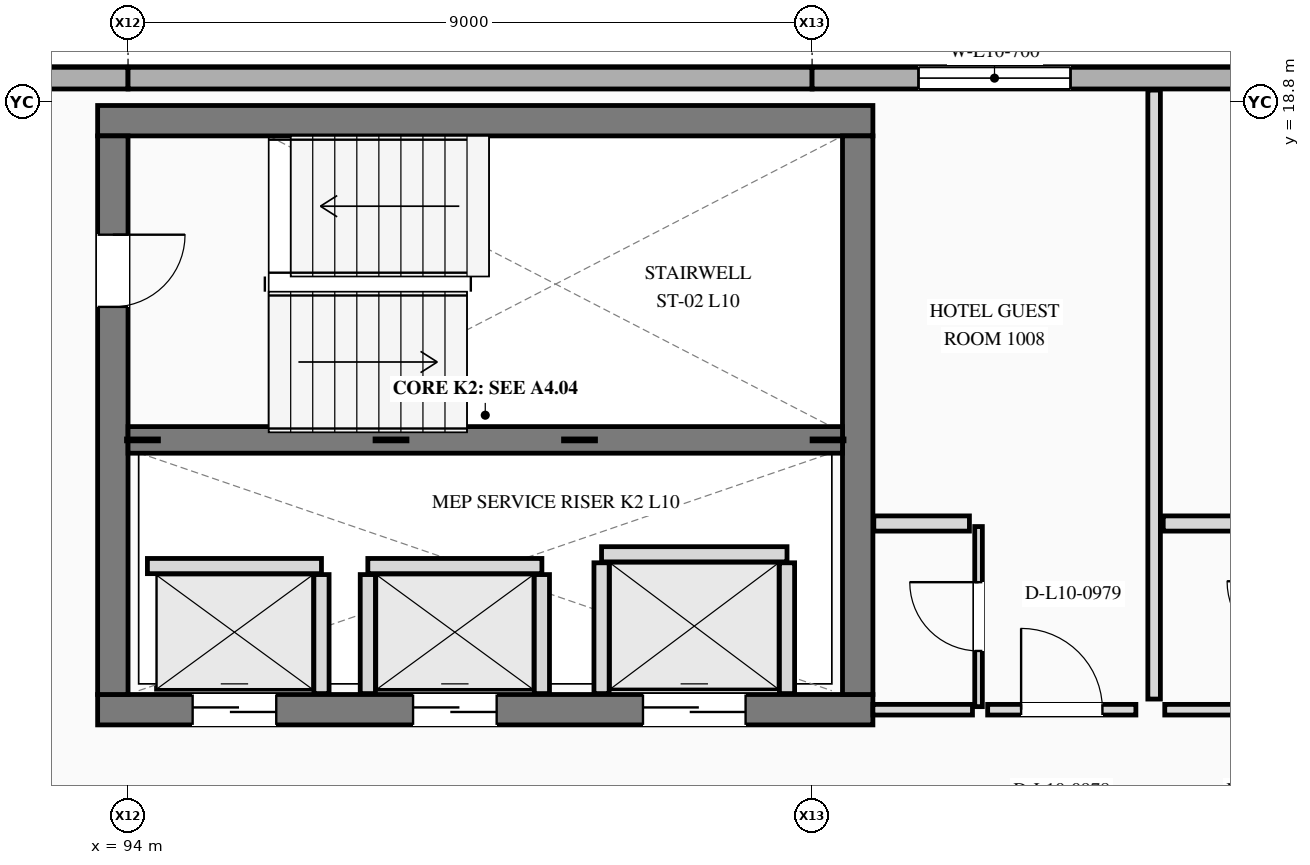
"""IFC4 building model, lengths in metres.
Left out: names, types, materials, properties, quantities, classifications, styles, units other than length and angle.
Written with IfcOpenShell. Run it as: python <this file> out.ifc"""

import sys

from ifc_helpers import new_model, si_unit, direction, frame, frame_2d, origin, place, context, subcontext, project, spatial, rectangle, extrude, element, fill, save


model = new_model("IFC4")
c1 = context("Model", 3, precision=1e-05, world=origin(), true_north=direction((0.0, 1.0)))
c2 = subcontext(c1, "Body", "Model", "MODEL_VIEW")
j1 = project(units=[si_unit("LENGTHUNIT", "METRE"), si_unit("PLANEANGLEUNIT", "RADIAN")], contexts=[c1])
p1 = place(None, origin())
s1 = spatial("IfcSite", under=j1, at=p1, CompositionType="ELEMENT")
p2 = place(p1, origin())
s2 = spatial("IfcBuilding", under=s1, at=p2, CompositionType="ELEMENT")
p3 = place(p2, frame((0.0, 0.0, 41.1)))
s3 = spatial("IfcBuildingStorey", under=s2, at=p3, CompositionType="ELEMENT", Elevation=41.1)
p4 = place(p3, frame((94.0, 19.11, 0.0), z_axis=(0.0, 0.0, 1.0), x_axis=(-1.0, 0.0, 0.0)))
e1 = element("IfcWall", 1, at=p4, inside=s3, PredefinedType="STANDARD", context=c2, shape_type="SweptSolid", body=[
    extrude(rectangle(XDim=9.31, YDim=0.285, at=frame_2d((4.655, 0.0))), origin(), (0.0, 0.0, 1.0), 3.5),
])
p5 = place(p3, frame((103.0, 19.11, 0.0), z_axis=(0.0, 0.0, 1.0), x_axis=(-1.0, 0.0, 0.0)))
e2 = element("IfcWall", 2, at=p5, inside=s3, PredefinedType="STANDARD", context=c2, shape_type="SweptSolid", body=[
    extrude(rectangle(XDim=9.0, YDim=0.285, at=frame_2d((4.5, 0.0))), origin(), (0.0, 0.0, 1.0), 3.5),
])
p6 = place(p3, frame((112.0, 19.11, 0.0), z_axis=(0.0, 0.0, 1.0), x_axis=(-1.0, 0.0, 0.0)))
e3 = element("IfcWall", 3, at=p6, inside=s3, PredefinedType="STANDARD", context=c2, shape_type="SweptSolid", body=[
    extrude(rectangle(XDim=9.0, YDim=0.285, at=frame_2d((4.5, 0.0))), origin(), (0.0, 0.0, 1.0), 3.5),
])
p7 = place(p6, frame((5.6, 0.0, 0.85)))
e4 = element("IfcOpeningElement", 4, at=p7, cuts=e3, PredefinedType="OPENING", context=c2, shape_type="SweptSolid", body=[
    extrude(rectangle(XDim=2.0, YDim=1.65, at=frame_2d((1.0, 0.825))), frame((0.0, 0.152, 0.0), z_axis=(0.0, -1.0, 0.0), x_axis=(1.0, 0.0, 0.0)), (0.0, 0.0, 1.0), 0.305),
])
p8 = place(p6, frame((1.4, 0.0, 0.85)))
e5 = element("IfcOpeningElement", 5, at=p8, cuts=e3, PredefinedType="OPENING", context=c2, shape_type="SweptSolid", body=[
    extrude(rectangle(XDim=2.0, YDim=1.65, at=frame_2d((1.0, 0.825))), frame((0.0, 0.152, 0.0), z_axis=(0.0, -1.0, 0.0), x_axis=(1.0, 0.0, 0.0)), (0.0, 0.0, 1.0), 0.305),
])
p9 = place(p3, frame((93.6, 10.8, 0.0), z_axis=(0.0, 0.0, 1.0), x_axis=(1.0, 0.0, 0.0)))
e6 = element("IfcWall", 6, at=p9, inside=s3, PredefinedType="SHEAR", context=c2, shape_type="SweptSolid", body=[
    extrude(rectangle(XDim=10.2, YDim=0.4, at=frame_2d((5.1, 0.0))), origin(), (0.0, 0.0, 1.0), 3.5),
])
p10 = place(p9, frame((1.25, 0.0, 0.0)))
e7 = element("IfcOpeningElement", 7, at=p10, cuts=e6, PredefinedType="OPENING", context=c2, shape_type="SweptSolid", body=[
    extrude(rectangle(XDim=1.1, YDim=2.2, at=frame_2d((0.55, 1.1))), frame((0.0, 0.21, 0.0), z_axis=(0.0, -1.0, 0.0), x_axis=(1.0, 0.0, 0.0)), (0.0, 0.0, 1.0), 0.42),
])
p11 = place(p9, frame((4.15, 0.0, 0.0)))
e8 = element("IfcOpeningElement", 8, at=p11, cuts=e6, PredefinedType="OPENING", context=c2, shape_type="SweptSolid", body=[
    extrude(rectangle(XDim=1.1, YDim=2.2, at=frame_2d((0.55, 1.1))), frame((0.0, 0.21, 0.0), z_axis=(0.0, -1.0, 0.0), x_axis=(1.0, 0.0, 0.0)), (0.0, 0.0, 1.0), 0.42),
])
p12 = place(p9, frame((7.175, 0.0, 0.0)))
e9 = element("IfcOpeningElement", 9, at=p12, cuts=e6, PredefinedType="OPENING", context=c2, shape_type="SweptSolid", body=[
    extrude(rectangle(XDim=1.35, YDim=2.3, at=frame_2d((0.675, 1.15))), frame((0.0, 0.21, 0.0), z_axis=(0.0, -1.0, 0.0), x_axis=(1.0, 0.0, 0.0)), (0.0, 0.0, 1.0), 0.42),
])
p13 = place(p3, frame((103.8, 18.55, 0.0), z_axis=(0.0, 0.0, 1.0), x_axis=(-1.0, 0.0, 0.0)))
e10 = element("IfcWall", 10, at=p13, inside=s3, PredefinedType="SHEAR", context=c2, shape_type="SweptSolid", body=[
    extrude(rectangle(XDim=10.2, YDim=0.4, at=frame_2d((5.1, 0.0))), origin(), (0.0, 0.0, 1.0), 3.5),
])
p14 = place(p3, frame((93.8, 18.35, 0.0), z_axis=(0.0, 0.0, 1.0), x_axis=(0.0, -1.0, 0.0)))
e11 = element("IfcWall", 11, at=p14, inside=s3, PredefinedType="SHEAR", context=c2, shape_type="SweptSolid", body=[
    extrude(rectangle(XDim=7.35, YDim=0.4, at=frame_2d((3.675, 0.0))), origin(), (0.0, 0.0, 1.0), 3.5),
])
p15 = place(p14, frame((1.3, 0.0, 0.0)))
e12 = element("IfcOpeningElement", 12, at=p15, cuts=e11, PredefinedType="OPENING", context=c2, shape_type="SweptSolid", body=[
    extrude(rectangle(XDim=0.95, YDim=2.2, at=frame_2d((0.475, 1.1))), frame((0.0, 0.21, 0.0), z_axis=(0.0, -1.0, 0.0), x_axis=(1.0, 0.0, 0.0)), (0.0, 0.0, 1.0), 0.42),
])
p16 = place(p3, frame((103.6, 11.0, 0.0), z_axis=(0.0, 0.0, 1.0), x_axis=(0.0, 1.0, 0.0)))
e13 = element("IfcWall", 13, at=p16, inside=s3, PredefinedType="SHEAR", context=c2, shape_type="SweptSolid", body=[
    extrude(rectangle(XDim=7.35, YDim=0.4, at=frame_2d((3.675, 0.0))), origin(), (0.0, 0.0, 1.0), 3.5),
])
p17 = place(p3, frame((94.0, 14.35, 0.0), z_axis=(0.0, 0.0, 1.0), x_axis=(1.0, 0.0, 0.0)))
e14 = element("IfcWall", 14, at=p17, inside=s3, PredefinedType="SHEAR", context=c2, shape_type="SweptSolid", body=[
    extrude(rectangle(XDim=9.4, YDim=0.35, at=frame_2d((4.7, 0.0))), origin(), (0.0, 0.0, 1.0), 3.5),
])
p18 = place(p3, frame((94.255, 12.69, 0.0), z_axis=(0.0, 0.0, 1.0), x_axis=(1.0, 0.0, 0.0)))
e15 = element("IfcWall", 15, at=p18, inside=s3, PredefinedType="PLUMBINGWALL", context=c2, shape_type="SweptSolid", body=[
    extrude(rectangle(XDim=2.29, YDim=0.2, at=frame_2d((1.145, 0.0))), origin(), (0.0, 0.0, 1.0), 3.18),
])
p19 = place(p3, frame((96.545, 11.012, 0.0), z_axis=(0.0, 0.0, 1.0), x_axis=(0.0, 1.0, 0.0)))
e16 = element("IfcWall", 16, at=p19, inside=s3, PredefinedType="PLUMBINGWALL", context=c2, shape_type="SweptSolid", body=[
    extrude(rectangle(XDim=1.566, YDim=0.2, at=frame_2d((0.783, 0.0))), origin(), (0.0, 0.0, 1.0), 3.18),
])
p20 = place(p3, frame((97.155, 12.69, 0.0), z_axis=(0.0, 0.0, 1.0), x_axis=(1.0, 0.0, 0.0)))
e17 = element("IfcWall", 17, at=p20, inside=s3, PredefinedType="PLUMBINGWALL", context=c2, shape_type="SweptSolid", body=[
    extrude(rectangle(XDim=2.29, YDim=0.2, at=frame_2d((1.145, 0.0))), origin(), (0.0, 0.0, 1.0), 3.18),
])
for number, where, z_axis, x_axis in (
    (18, (97.155, 11.012, 0.0), (0.0, 0.0, 1.0), (0.0, 1.0, 0.0)),
    (19, (99.445, 11.012, 0.0), (0.0, 0.0, 1.0), (0.0, 1.0, 0.0)),
):
    element("IfcWall", number, at=place(p3, frame(where, z_axis=z_axis, x_axis=x_axis)), inside=s3, PredefinedType="PLUMBINGWALL", context=c2, shape_type="SweptSolid", body=[
        extrude(rectangle(XDim=1.566, YDim=0.2, at=frame_2d((0.783, 0.0))), origin(), (0.0, 0.0, 1.0), 3.18),
    ])
p21 = place(p3, frame((100.23, 12.845, 0.0), z_axis=(0.0, 0.0, 1.0), x_axis=(1.0, 0.0, 0.0)))
e20 = element("IfcWall", 20, at=p21, inside=s3, PredefinedType="PLUMBINGWALL", context=c2, shape_type="SweptSolid", body=[
    extrude(rectangle(XDim=2.44, YDim=0.2, at=frame_2d((1.22, 0.0))), origin(), (0.0, 0.0, 1.0), 3.18),
])
for number, where, z_axis, x_axis in (
    (21, (100.23, 11.012, 0.0), (0.0, 0.0, 1.0), (0.0, 1.0, 0.0)),
    (22, (102.67, 11.012, 0.0), (0.0, 0.0, 1.0), (0.0, 1.0, 0.0)),
):
    element("IfcWall", number, at=place(p3, frame(where, z_axis=z_axis, x_axis=x_axis)), inside=s3, PredefinedType="PLUMBINGWALL", context=c2, shape_type="SweptSolid", body=[
        extrude(rectangle(XDim=1.721, YDim=0.2, at=frame_2d((0.86, 0.0))), origin(), (0.0, 0.0, 1.0), 3.18),
    ])
p22 = place(p3, frame((103.8, 10.8, 0.0), z_axis=(0.0, 0.0, 1.0), x_axis=(1.0, 0.0, 0.0)))
e23 = element("IfcWall", 23, at=p22, inside=s3, PredefinedType="PARTITIONING", context=c2, shape_type="SweptSolid", body=[
    extrude(rectangle(XDim=1.31, YDim=0.14, at=frame_2d((0.655, 0.0))), origin(), (0.0, 0.0, 1.0), 3.18),
])
p23 = place(p3, frame((105.31, 10.8, 0.0), z_axis=(0.0, 0.0, 1.0), x_axis=(1.0, 0.0, 0.0)))
e24 = element("IfcWall", 24, at=p23, inside=s3, PredefinedType="PARTITIONING", context=c2, shape_type="SweptSolid", body=[
    extrude(rectangle(XDim=1.95, YDim=0.14, at=frame_2d((0.975, 0.0))), origin(), (0.0, 0.0, 1.0), 3.18),
])
p24 = place(p23, frame((0.44, 0.0, 0.0)))
e25 = element("IfcOpeningElement", 25, at=p24, cuts=e24, PredefinedType="OPENING", context=c2, shape_type="SweptSolid", body=[
    extrude(rectangle(XDim=1.07, YDim=2.25, at=frame_2d((0.535, 1.125))), frame((0.0, 0.08, 0.0), z_axis=(0.0, -1.0, 0.0), x_axis=(1.0, 0.0, 0.0)), (0.0, 0.0, 1.0), 0.16),
])
p25 = place(p3, frame((107.5, 10.94, 0.0), z_axis=(0.0, 0.0, 1.0), x_axis=(0.0, 1.0, 0.0)))
e26 = element("IfcWall", 26, at=p25, inside=s3, PredefinedType="PARTITIONING", context=c2, shape_type="SweptSolid", body=[
    extrude(rectangle(XDim=8.012, YDim=0.165, at=frame_2d((4.006, 0.0))), origin(), (0.0, 0.0, 1.0), 3.18),
])
p26 = place(p3, frame((105.19, 10.84, 0.0), z_axis=(0.0, 0.0, 1.0), x_axis=(0.0, 1.0, 0.0)))
e27 = element("IfcWall", 27, at=p26, inside=s3, PredefinedType="PARTITIONING", context=c2, shape_type="SweptSolid", body=[
    extrude(rectangle(XDim=2.37, YDim=0.1, at=frame_2d((1.185, 0.0))), origin(), (0.0, 0.0, 1.0), 3.18),
])
p27 = place(p26, frame((0.733, 0.0, 0.0)))
e28 = element("IfcOpeningElement", 28, at=p27, cuts=e27, PredefinedType="OPENING", context=c2, shape_type="SweptSolid", body=[
    extrude(rectangle(XDim=0.905, YDim=2.1, at=frame_2d((0.453, 1.05))), frame((0.0, 0.06, 0.0), z_axis=(0.0, -1.0, 0.0), x_axis=(1.0, 0.0, 0.0)), (0.0, 0.0, 1.0), 0.12),
])
p28 = place(p3, frame((103.812, 13.25, 0.0), z_axis=(0.0, 0.0, 1.0), x_axis=(1.0, 0.0, 0.0)))
e29 = element("IfcWall", 29, at=p28, inside=s3, PredefinedType="PLUMBINGWALL", context=c2, shape_type="SweptSolid", body=[
    extrude(rectangle(XDim=1.258, YDim=0.2, at=frame_2d((0.629, 0.0))), origin(), (0.0, 0.0, 1.0), 3.18),
])
p29 = place(p3, frame((107.64, 10.8, 0.0), z_axis=(0.0, 0.0, 1.0), x_axis=(1.0, 0.0, 0.0)))
e30 = element("IfcWall", 30, at=p29, inside=s3, PredefinedType="PARTITIONING", context=c2, shape_type="SweptSolid", body=[
    extrude(rectangle(XDim=1.67, YDim=0.14, at=frame_2d((0.835, 0.0))), origin(), (0.0, 0.0, 1.0), 3.18),
])
p30 = place(p3, frame((107.62, 13.25, 0.0), z_axis=(0.0, 0.0, 1.0), x_axis=(1.0, 0.0, 0.0)))
e31 = element("IfcWall", 31, at=p30, inside=s3, PredefinedType="PLUMBINGWALL", context=c2, shape_type="SweptSolid", body=[
    extrude(rectangle(XDim=1.65, YDim=0.2, at=frame_2d((0.825, 0.0))), origin(), (0.0, 0.0, 1.0), 3.18),
])
p31 = place(p7, origin())
e32 = element("IfcWindow", 32, at=p31, inside=s3, PartitioningType="SINGLE_PANEL", PredefinedType="WINDOW", context=c2, shape_type="SweptSolid", body=[
    extrude(rectangle(XDim=2.0, YDim=1.65, at=frame_2d((1.0, 0.825))), frame((0.0, 0.03, 0.0), z_axis=(0.0, -1.0, 0.0), x_axis=(1.0, 0.0, 0.0)), (0.0, 0.0, 1.0), 0.06),
])
fill(e4, e32)
p32 = place(p15, origin())
e33 = element("IfcDoor", 33, at=p32, inside=s3, OperationType="SINGLE_SWING_LEFT", PredefinedType="DOOR", context=c2, shape_type="SweptSolid", body=[
    extrude(rectangle(XDim=0.95, YDim=2.2, at=frame_2d((0.475, 1.1))), frame((0.0, 0.025, 0.0), z_axis=(0.0, -1.0, 0.0), x_axis=(1.0, 0.0, 0.0)), (0.0, 0.0, 1.0), 0.05),
])
fill(e12, e33)
p33 = place(p10, origin())
e34 = element("IfcDoor", 34, at=p33, inside=s3, OperationType="SLIDING_TO_LEFT", PredefinedType="DOOR", context=c2, shape_type="SweptSolid", body=[
    extrude(rectangle(XDim=1.1, YDim=2.2, at=frame_2d((0.55, 1.1))), frame((0.0, 0.025, 0.0), z_axis=(0.0, -1.0, 0.0), x_axis=(1.0, 0.0, 0.0)), (0.0, 0.0, 1.0), 0.05),
])
fill(e7, e34)
p34 = place(p11, origin())
e35 = element("IfcDoor", 35, at=p34, inside=s3, OperationType="SLIDING_TO_RIGHT", PredefinedType="DOOR", context=c2, shape_type="SweptSolid", body=[
    extrude(rectangle(XDim=1.1, YDim=2.2, at=frame_2d((0.55, 1.1))), frame((0.0, 0.025, 0.0), z_axis=(0.0, -1.0, 0.0), x_axis=(1.0, 0.0, 0.0)), (0.0, 0.0, 1.0), 0.05),
])
fill(e8, e35)
p35 = place(p12, origin())
e36 = element("IfcDoor", 36, at=p35, inside=s3, OperationType="SLIDING_TO_LEFT", PredefinedType="DOOR", context=c2, shape_type="SweptSolid", body=[
    extrude(rectangle(XDim=1.35, YDim=2.3, at=frame_2d((0.675, 1.15))), frame((0.0, 0.025, 0.0), z_axis=(0.0, -1.0, 0.0), x_axis=(1.0, 0.0, 0.0)), (0.0, 0.0, 1.0), 0.05),
])
fill(e9, e36)
p36 = place(p24, origin())
e37 = element("IfcDoor", 37, at=p36, inside=s3, OperationType="SINGLE_SWING_LEFT", PredefinedType="DOOR", context=c2, shape_type="SweptSolid", body=[
    extrude(rectangle(XDim=1.07, YDim=2.25, at=frame_2d((0.535, 1.125))), frame((0.0, 0.025, 0.0), z_axis=(0.0, -1.0, 0.0), x_axis=(1.0, 0.0, 0.0)), (0.0, 0.0, 1.0), 0.05),
])
fill(e25, e37)
p37 = place(p27, origin())
e38 = element("IfcDoor", 38, at=p37, inside=s3, OperationType="SINGLE_SWING_RIGHT", PredefinedType="DOOR", context=c2, shape_type="SweptSolid", body=[
    extrude(rectangle(XDim=0.905, YDim=2.1, at=frame_2d((0.453, 1.05))), frame((0.0, 0.025, 0.0), z_axis=(0.0, -1.0, 0.0), x_axis=(1.0, 0.0, 0.0)), (0.0, 0.0, 1.0), 0.05),
])
fill(e28, e38)
save(model, sys.argv[1])
